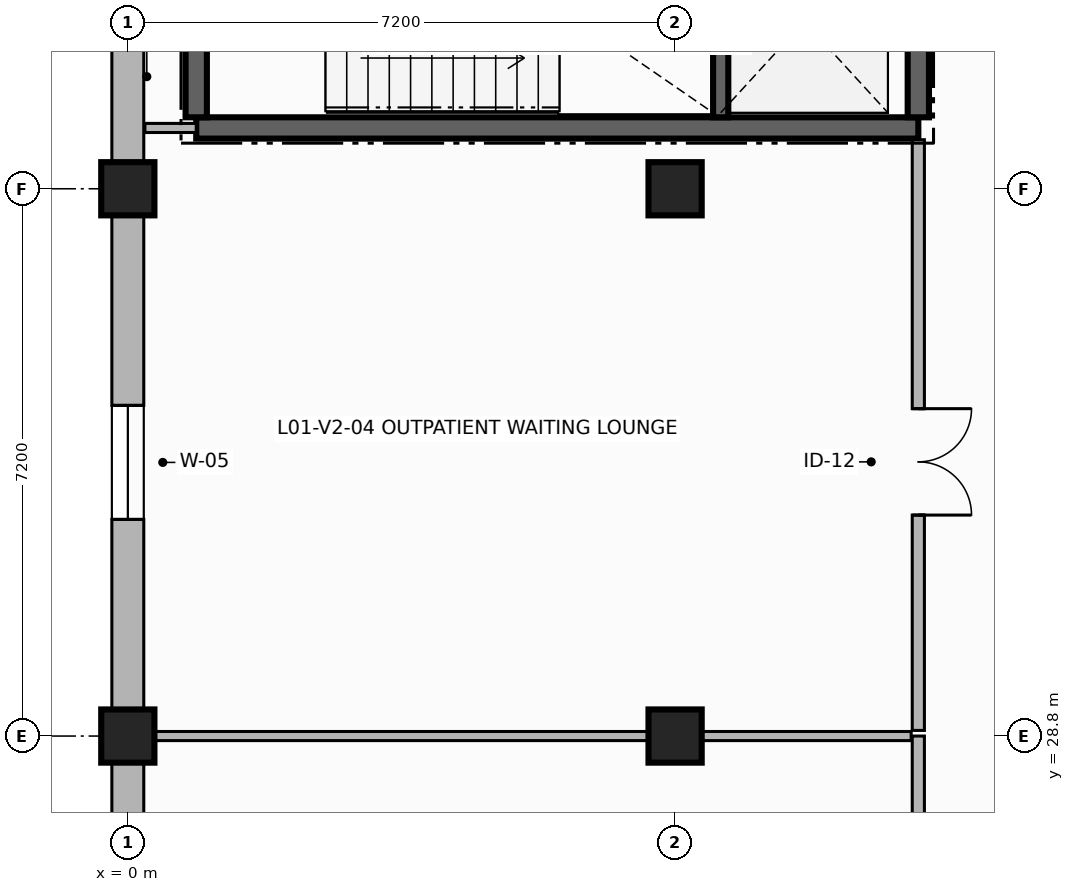
"""IFC4 building model, lengths in metres.
Left out: names, types, materials, properties, quantities, classifications, styles, units other than length and angle.
Written with IfcOpenShell. Run it as: python <this file> out.ifc"""

import sys

from ifc_helpers import new_model, si_unit, direction, frame, frame_2d, origin, origin_2d, place, context, subcontext, project, spatial, rectangle, extrude, element, fill, save


model = new_model("IFC4")
c1 = context("Model", 3, precision=1e-05, world=origin(), true_north=direction((0.0, 1.0)))
c2 = subcontext(c1, "Body", "Model", "MODEL_VIEW")
j1 = project(units=[si_unit("LENGTHUNIT", "METRE"), si_unit("PLANEANGLEUNIT", "RADIAN")], contexts=[c1])
p1 = place(None, origin())
s1 = spatial("IfcSite", under=j1, at=p1, CompositionType="ELEMENT")
p2 = place(p1, origin())
s2 = spatial("IfcBuilding", under=s1, at=p2, CompositionType="ELEMENT")
p3 = place(p2, frame((0.0, 0.0, 4.5)))
s3 = spatial("IfcBuildingStorey", under=s2, at=p3, CompositionType="ELEMENT", Elevation=4.5)
for number, where, z_axis, x_axis in (
    (1, (0.0, 28.8, 0.0), (0.0, 0.0, 1.0), (1.0, 0.0, 0.0)),
    (2, (0.0, 36.0, 0.0), (0.0, 0.0, 1.0), (1.0, 0.0, 0.0)),
    (3, (7.2, 28.8, 0.0), (0.0, 0.0, 1.0), (1.0, 0.0, 0.0)),
    (4, (7.2, 36.0, 0.0), (0.0, 0.0, 1.0), (1.0, 0.0, 0.0)),
):
    element("IfcColumn", number, at=place(p3, frame(where, z_axis=z_axis, x_axis=x_axis)), inside=s3, PredefinedType="COLUMN", context=c2, shape_type="SweptSolid", body=[
        extrude(rectangle(XDim=0.7, YDim=0.7, at=origin_2d()), origin(), (0.0, 0.0, 1.0), 3.62),
    ])
p4 = place(p3, frame((0.0, 43.2, 0.0), z_axis=(0.0, 0.0, 1.0), x_axis=(0.0, -1.0, 0.0)))
e5 = element("IfcWall", 5, at=p4, inside=s3, PredefinedType="SOLIDWALL", context=c2, shape_type="SweptSolid", body=[
    extrude(rectangle(XDim=7.2, YDim=0.42, at=frame_2d((3.6, 0.0))), origin(), (0.0, 0.0, 1.0), 3.0),
])
p5 = place(p4, frame((2.75, 0.0, 0.85)))
e6 = element("IfcOpeningElement", 6, at=p5, cuts=e5, PredefinedType="OPENING", context=c2, shape_type="SweptSolid", body=[
    extrude(rectangle(XDim=1.5, YDim=1.9, at=frame_2d((0.75, 0.95))), frame((0.0, 0.22, 0.0), z_axis=(0.0, -1.0, 0.0), x_axis=(1.0, 0.0, 0.0)), (0.0, 0.0, 1.0), 0.44),
])
p6 = place(p3, frame((0.0, 36.0, 0.0), z_axis=(0.0, 0.0, 1.0), x_axis=(0.0, -1.0, 0.0)))
e7 = element("IfcWall", 7, at=p6, inside=s3, PredefinedType="SOLIDWALL", context=c2, shape_type="SweptSolid", body=[
    extrude(rectangle(XDim=7.2, YDim=0.42, at=frame_2d((3.6, 0.0))), origin(), (0.0, 0.0, 1.0), 3.0),
])
p7 = place(p6, frame((2.85, 0.0, 0.85)))
e8 = element("IfcOpeningElement", 8, at=p7, cuts=e7, PredefinedType="OPENING", context=c2, shape_type="SweptSolid", body=[
    extrude(rectangle(XDim=1.5, YDim=1.9, at=frame_2d((0.75, 0.95))), frame((0.0, 0.22, 0.0), z_axis=(0.0, -1.0, 0.0), x_axis=(1.0, 0.0, 0.0)), (0.0, 0.0, 1.0), 0.44),
])
p8 = place(p3, frame((0.0, 28.8, 0.0), z_axis=(0.0, 0.0, 1.0), x_axis=(0.0, -1.0, 0.0)))
e9 = element("IfcWall", 9, at=p8, inside=s3, PredefinedType="SOLIDWALL", context=c2, shape_type="SweptSolid", body=[
    extrude(rectangle(XDim=7.2, YDim=0.42, at=frame_2d((3.6, 0.0))), origin(), (0.0, 0.0, 1.0), 3.0),
])
p9 = place(p8, frame((2.85, 0.0, 0.85)))
e10 = element("IfcOpeningElement", 10, at=p9, cuts=e9, PredefinedType="OPENING", context=c2, shape_type="SweptSolid", body=[
    extrude(rectangle(XDim=1.5, YDim=1.9, at=frame_2d((0.75, 0.95))), frame((0.0, 0.22, 0.0), z_axis=(0.0, -1.0, 0.0), x_axis=(1.0, 0.0, 0.0)), (0.0, 0.0, 1.0), 0.44),
])
p10 = place(p3, frame((0.9, 36.8, 0.0), z_axis=(0.0, 0.0, 1.0), x_axis=(1.0, 0.0, 0.0)))
e11 = element("IfcWall", 11, at=p10, inside=s3, PredefinedType="SHEAR", context=c2, shape_type="SweptSolid", body=[
    extrude(rectangle(XDim=9.5, YDim=0.28, at=frame_2d((4.75, 0.0))), origin(), (0.0, 0.0, 1.0), 3.62),
])
p11 = place(p3, frame((10.4, 36.94, 0.0), z_axis=(0.0, 0.0, 1.0), x_axis=(0.0, 1.0, 0.0)))
e12 = element("IfcWall", 12, at=p11, inside=s3, PredefinedType="SHEAR", context=c2, shape_type="SweptSolid", body=[
    extrude(rectangle(XDim=5.52, YDim=0.28, at=frame_2d((2.76, 0.0))), origin(), (0.0, 0.0, 1.0), 3.62),
])
p12 = place(p11, frame((4.05, 0.0, 0.0)))
e13 = element("IfcOpeningElement", 13, at=p12, cuts=e12, PredefinedType="OPENING", context=c2, shape_type="SweptSolid", body=[
    extrude(rectangle(XDim=1.15, YDim=2.2, at=frame_2d((0.575, 1.1))), frame((0.0, 0.15, 0.0), z_axis=(0.0, -1.0, 0.0), x_axis=(1.0, 0.0, 0.0)), (0.0, 0.0, 1.0), 0.3),
])
p13 = place(p3, frame((0.9, 42.46, 0.0), z_axis=(0.0, 0.0, 1.0), x_axis=(0.0, -1.0, 0.0)))
e14 = element("IfcWall", 14, at=p13, inside=s3, PredefinedType="SHEAR", context=c2, shape_type="SweptSolid", body=[
    extrude(rectangle(XDim=5.52, YDim=0.28, at=frame_2d((2.76, 0.0))), origin(), (0.0, 0.0, 1.0), 3.62),
])
p14 = place(p3, frame((7.8, 36.94, 0.0), z_axis=(0.0, 0.0, 1.0), x_axis=(0.0, 1.0, 0.0)))
e15 = element("IfcWall", 15, at=p14, inside=s3, PredefinedType="SHEAR", context=c2, shape_type="SweptSolid", body=[
    extrude(rectangle(XDim=3.66, YDim=0.2, at=frame_2d((1.83, 0.0))), origin(), (0.0, 0.0, 1.0), 3.62),
])
p15 = place(p3, frame((10.4, 28.8, 0.0), z_axis=(0.0, 0.0, 1.0), x_axis=(0.0, -1.0, 0.0)))
e16 = element("IfcWall", 16, at=p15, inside=s3, PredefinedType="PARTITIONING", context=c2, shape_type="SweptSolid", body=[
    extrude(rectangle(XDim=7.116, YDim=0.16, at=frame_2d((3.558, 0.0))), origin(), (0.0, 0.0, 1.0), 2.98),
])
p16 = place(p15, frame((3.033, 0.0, 0.0)))
e17 = element("IfcOpeningElement", 17, at=p16, cuts=e16, PredefinedType="OPENING", context=c2, shape_type="SweptSolid", body=[
    extrude(rectangle(XDim=1.05, YDim=2.2, at=frame_2d((0.525, 1.1))), frame((0.0, 0.09, 0.0), z_axis=(0.0, -1.0, 0.0), x_axis=(1.0, 0.0, 0.0)), (0.0, 0.0, 1.0), 0.18),
])
p17 = place(p3, frame((0.225, 28.8, 0.0), z_axis=(0.0, 0.0, 1.0), x_axis=(1.0, 0.0, 0.0)))
e18 = element("IfcWall", 18, at=p17, inside=s3, PredefinedType="PARTITIONING", context=c2, shape_type="SweptSolid", body=[
    extrude(rectangle(XDim=10.081, YDim=0.12, at=frame_2d((5.041, 0.0))), origin(), (0.0, 0.0, 1.0), 2.98),
])
p18 = place(p3, frame((10.4, 36.645, 0.0), z_axis=(0.0, 0.0, 1.0), x_axis=(0.0, -1.0, 0.0)))
e19 = element("IfcWall", 19, at=p18, inside=s3, PredefinedType="PARTITIONING", context=c2, shape_type="SweptSolid", body=[
    extrude(rectangle(XDim=7.771, YDim=0.16, at=frame_2d((3.885, 0.0))), origin(), (0.0, 0.0, 1.0), 2.98),
])
p19 = place(p18, frame((3.538, 0.0, 0.0)))
e20 = element("IfcOpeningElement", 20, at=p19, cuts=e19, PredefinedType="OPENING", context=c2, shape_type="SweptSolid", body=[
    extrude(rectangle(XDim=1.4, YDim=2.3, at=frame_2d((0.7, 1.15))), frame((0.0, 0.09, 0.0), z_axis=(0.0, -1.0, 0.0), x_axis=(1.0, 0.0, 0.0)), (0.0, 0.0, 1.0), 0.18),
])
p20 = place(p3, frame((0.225, 36.8, 0.0), z_axis=(0.0, 0.0, 1.0), x_axis=(1.0, 0.0, 0.0)))
e21 = element("IfcWall", 21, at=p20, inside=s3, PredefinedType="PARTITIONING", context=c2, shape_type="SweptSolid", body=[
    extrude(rectangle(XDim=0.675, YDim=0.12, at=frame_2d((0.337, 0.0))), origin(), (0.0, 0.0, 1.0), 2.98),
])
p21 = place(p7, origin())
e22 = element("IfcWindow", 22, at=p21, inside=s3, PartitioningType="SINGLE_PANEL", PredefinedType="WINDOW", context=c2, shape_type="SweptSolid", body=[
    extrude(rectangle(XDim=1.5, YDim=1.9, at=frame_2d((0.75, 0.95))), frame((0.0, 0.03, 0.0), z_axis=(0.0, -1.0, 0.0), x_axis=(1.0, 0.0, 0.0)), (0.0, 0.0, 1.0), 0.06),
])
fill(e8, e22)
p22 = place(p19, origin())
e23 = element("IfcDoor", 23, at=p22, inside=s3, OperationType="DOUBLE_DOOR_SINGLE_SWING", PredefinedType="DOOR", context=c2, shape_type="SweptSolid", body=[
    extrude(rectangle(XDim=1.4, YDim=2.3, at=frame_2d((0.7, 1.15))), frame((0.0, 0.025, 0.0), z_axis=(0.0, -1.0, 0.0), x_axis=(1.0, 0.0, 0.0)), (0.0, 0.0, 1.0), 0.05),
])
fill(e20, e23)
save(model, sys.argv[1])
